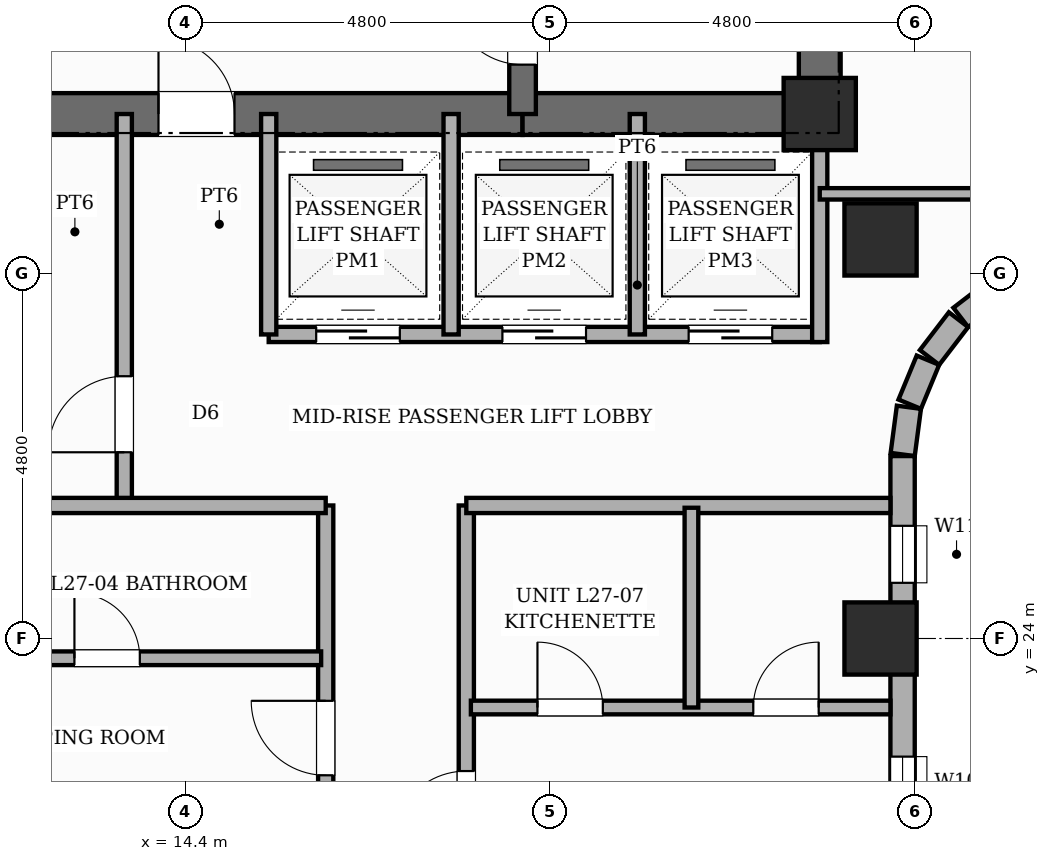
"""IFC4 building model, lengths in metres.
Left out: names, types, materials, properties, quantities, classifications, styles, units other than length and angle.
Written with IfcOpenShell. Run it as: python <this file> out.ifc"""

import sys

from ifc_helpers import new_model, si_unit, direction, frame, frame_2d, origin, origin_2d, place, context, subcontext, project, spatial, rectangle, extrude, element, fill, save


model = new_model("IFC4")
c1 = context("Model", 3, precision=1e-05, world=origin(), true_north=direction((0.0, 1.0)))
c2 = subcontext(c1, "Body", "Model", "MODEL_VIEW")
j1 = project(units=[si_unit("LENGTHUNIT", "METRE"), si_unit("PLANEANGLEUNIT", "RADIAN")], contexts=[c1])
p1 = place(None, origin())
s1 = spatial("IfcSite", under=j1, at=p1, CompositionType="ELEMENT")
p2 = place(p1, origin())
s2 = spatial("IfcBuilding", under=s1, at=p2, CompositionType="ELEMENT")
p3 = place(p2, frame((0.0, 0.0, 107.2)))
s3 = spatial("IfcBuildingStorey", under=s2, at=p3, CompositionType="ELEMENT", Elevation=107.2)
p4 = place(p3, frame((22.75, 30.625, 0.0), z_axis=(0.0, 0.0, 1.0), x_axis=(0.0, 1.0, 0.0)))
e1 = element("IfcWall", 1, at=p4, inside=s3, PredefinedType="SHEAR", context=c2, shape_type="SweptSolid", body=[
    extrude(rectangle(XDim=15.45, YDim=0.55, at=frame_2d((7.725, 0.0))), origin(), (0.0, 0.0, 1.0), 3.6),
])
p5 = place(p4, frame((10.725, 0.0, 0.0)))
e2 = element("IfcOpeningElement", 2, at=p5, cuts=e1, PredefinedType="OPENING", context=c2, shape_type="SweptSolid", body=[
    extrude(rectangle(XDim=1.0, YDim=2.15, at=frame_2d((0.5, 1.075))), frame((0.0, 0.285, 0.0), z_axis=(0.0, -1.0, 0.0), x_axis=(1.0, 0.0, 0.0)), (0.0, 0.0, 1.0), 0.57),
])
p6 = place(p3, frame((9.96, 30.9, 0.0), z_axis=(0.0, 0.0, 1.0), x_axis=(1.0, 0.0, 0.0)))
e3 = element("IfcWall", 3, at=p6, inside=s3, PredefinedType="SHEAR", context=c2, shape_type="SweptSolid", body=[
    extrude(rectangle(XDim=8.88, YDim=0.55, at=frame_2d((4.44, 0.0))), origin(), (0.0, 0.0, 1.0), 3.6),
])
p7 = place(p6, frame((4.09, 0.0, 0.0)))
e4 = element("IfcOpeningElement", 4, at=p7, cuts=e3, PredefinedType="OPENING", context=c2, shape_type="SweptSolid", body=[
    extrude(rectangle(XDim=1.0, YDim=2.15, at=frame_2d((0.5, 1.075))), frame((0.0, 0.285, 0.0), z_axis=(0.0, -1.0, 0.0), x_axis=(1.0, 0.0, 0.0)), (0.0, 0.0, 1.0), 0.57),
])
p8 = place(p3, frame((18.84, 30.9, 0.0), z_axis=(0.0, 0.0, 1.0), x_axis=(1.0, 0.0, 0.0)))
e5 = element("IfcWall", 5, at=p8, inside=s3, PredefinedType="SHEAR", context=c2, shape_type="SweptSolid", body=[
    extrude(rectangle(XDim=3.91, YDim=0.55, at=frame_2d((1.955, 0.0))), origin(), (0.0, 0.0, 1.0), 3.6),
])
p9 = place(p3, frame((18.84, 30.9, 0.0), z_axis=(0.0, 0.0, 1.0), x_axis=(0.0, 1.0, 0.0)))
e6 = element("IfcWall", 6, at=p9, inside=s3, PredefinedType="SHEAR", context=c2, shape_type="SweptSolid", body=[
    extrude(rectangle(XDim=14.9, YDim=0.35, at=frame_2d((7.45, 0.0))), origin(), (0.0, 0.0, 1.0), 3.6),
])
p10 = place(p9, frame((0.65, 0.0, 0.0)))
e7 = element("IfcOpeningElement", 7, at=p10, cuts=e6, PredefinedType="OPENING", context=c2, shape_type="SweptSolid", body=[
    extrude(rectangle(XDim=0.95, YDim=2.1, at=frame_2d((0.475, 1.05))), frame((0.0, 0.185, 0.0), z_axis=(0.0, -1.0, 0.0), x_axis=(1.0, 0.0, 0.0)), (0.0, 0.0, 1.0), 0.37),
])
p11 = place(p9, frame((10.45, 0.0, 0.0)))
e8 = element("IfcOpeningElement", 8, at=p11, cuts=e6, PredefinedType="OPENING", context=c2, shape_type="SweptSolid", body=[
    extrude(rectangle(XDim=1.0, YDim=2.15, at=frame_2d((0.5, 1.075))), frame((0.0, 0.185, 0.0), z_axis=(0.0, -1.0, 0.0), x_axis=(1.0, 0.0, 0.0)), (0.0, 0.0, 1.0), 0.37),
])
for number, where, z_axis, x_axis in (
    (9, (22.75, 30.9, 0.0), (0.0, 0.0, 1.0), (1.0, 0.0, 0.0)),
    (10, (23.55, 24.0, 0.0), (0.0, 0.0, 1.0), (1.0, 0.0, 0.0)),
    (11, (23.55, 29.25, 0.0), (0.0, 0.0, 1.0), (1.0, 0.0, 0.0)),
):
    element("IfcColumn", number, at=place(p3, frame(where, z_axis=z_axis, x_axis=x_axis)), inside=s3, PredefinedType="COLUMN", context=c2, shape_type="SweptSolid", body=[
        extrude(rectangle(XDim=0.95, YDim=0.95, at=origin_2d()), origin(), (0.0, 0.0, 1.0), 3.6),
    ])
for number, where, z_axis, x_axis in (
    (12, (25.103, 28.605, 0.0), (0.0, 0.0, 1.0), (-0.793, -0.609, 0.0)),
    (13, (24.576, 28.195, 0.0), (0.0, 0.0, 1.0), (-0.609, -0.793, 0.0)),
):
    element("IfcWall", number, at=place(p3, frame(where, z_axis=z_axis, x_axis=x_axis)), inside=s3, PredefinedType="STANDARD", context=c2, shape_type="SweptSolid", body=[
        extrude(rectangle(XDim=0.626, YDim=0.32, at=frame_2d((0.313, 0.0))), origin(), (0.0, 0.0, 1.0), 3.36),
    ])
p12 = place(p3, frame((24.174, 27.661, 0.0), z_axis=(0.0, 0.0, 1.0), x_axis=(-0.382455093999, -0.923974080304, 0.0)))
e14 = element("IfcWall", 14, at=p12, inside=s3, PredefinedType="STANDARD", context=c2, shape_type="SweptSolid", body=[
    extrude(rectangle(XDim=0.626, YDim=0.32, at=frame_2d((0.313, 0.0))), origin(), (0.0, 0.0, 1.0), 3.36),
])
p13 = place(p3, frame((23.923, 27.042, 0.0), z_axis=(0.0, 0.0, 1.0), x_axis=(-0.130555323746, -0.9914410257, 0.0)))
e15 = element("IfcWall", 15, at=p13, inside=s3, PredefinedType="STANDARD", context=c2, shape_type="SweptSolid", body=[
    extrude(rectangle(XDim=0.626, YDim=0.32, at=frame_2d((0.313, 0.0))), origin(), (0.0, 0.0, 1.0), 2.54),
])
p14 = place(p3, frame((23.84, 26.4, 0.0), z_axis=(0.0, 0.0, 1.0), x_axis=(0.0, -1.0, 0.0)))
e16 = element("IfcWall", 16, at=p14, inside=s3, PredefinedType="STANDARD", context=c2, shape_type="SweptSolid", body=[
    extrude(rectangle(XDim=14.4, YDim=0.32, at=frame_2d((7.2, 0.0))), origin(), (0.0, 0.0, 1.0), 2.54),
])
p15 = place(p14, frame((9.354, 0.0, 0.65)))
e17 = element("IfcOpeningElement", 17, at=p15, cuts=e16, PredefinedType="OPENING", context=c2, shape_type="SweptSolid", body=[
    extrude(rectangle(XDim=1.4, YDim=1.1, at=frame_2d((0.7, 0.55))), frame((0.0, 0.17, 0.0), z_axis=(0.0, -1.0, 0.0), x_axis=(1.0, 0.0, 0.0)), (0.0, 0.0, 1.0), 0.34),
])
p16 = place(p14, frame((3.954, 0.0, 0.65)))
e18 = element("IfcOpeningElement", 18, at=p16, cuts=e16, PredefinedType="OPENING", context=c2, shape_type="SweptSolid", body=[
    extrude(rectangle(XDim=1.4, YDim=1.1, at=frame_2d((0.7, 0.55))), frame((0.0, 0.17, 0.0), z_axis=(0.0, -1.0, 0.0), x_axis=(1.0, 0.0, 0.0)), (0.0, 0.0, 1.0), 0.34),
])
p17 = place(p14, frame((12.707, 0.0, 0.45)))
e19 = element("IfcOpeningElement", 19, at=p17, cuts=e16, PredefinedType="OPENING", context=c2, shape_type="SweptSolid", body=[
    extrude(rectangle(XDim=0.95, YDim=1.8, at=frame_2d((0.475, 0.9))), frame((0.0, 0.17, 0.0), z_axis=(0.0, -1.0, 0.0), x_axis=(1.0, 0.0, 0.0)), (0.0, 0.0, 1.0), 0.34),
])
p18 = place(p14, frame((7.902, 0.0, 0.45)))
e20 = element("IfcOpeningElement", 20, at=p18, cuts=e16, PredefinedType="OPENING", context=c2, shape_type="SweptSolid", body=[
    extrude(rectangle(XDim=0.6, YDim=1.8, at=frame_2d((0.3, 0.9))), frame((0.0, 0.17, 0.0), z_axis=(0.0, -1.0, 0.0), x_axis=(1.0, 0.0, 0.0)), (0.0, 0.0, 1.0), 0.34),
])
p19 = place(p14, frame((0.917, 0.0, 0.45)))
e21 = element("IfcOpeningElement", 21, at=p19, cuts=e16, PredefinedType="OPENING", context=c2, shape_type="SweptSolid", body=[
    extrude(rectangle(XDim=0.75, YDim=1.8, at=frame_2d((0.375, 0.9))), frame((0.0, 0.17, 0.0), z_axis=(0.0, -1.0, 0.0), x_axis=(1.0, 0.0, 0.0)), (0.0, 0.0, 1.0), 0.34),
])
p20 = place(p3, frame((13.6, 25.75, 0.0), z_axis=(0.0, 0.0, 1.0), x_axis=(0.0, 1.0, 0.0)))
e22 = element("IfcWall", 22, at=p20, inside=s3, PredefinedType="POLYGONAL", context=c2, shape_type="SweptSolid", body=[
    extrude(rectangle(XDim=5.15, YDim=0.2, at=frame_2d((2.575, 0.0))), origin(), (0.0, 0.0, 1.0), 3.36),
])
p21 = place(p20, frame((0.7, 0.0, 0.0)))
e23 = element("IfcOpeningElement", 23, at=p21, cuts=e22, PredefinedType="OPENING", context=c2, shape_type="SweptSolid", body=[
    extrude(rectangle(XDim=1.0, YDim=2.15, at=frame_2d((0.5, 1.075))), frame((0.0, 0.11, 0.0), z_axis=(0.0, -1.0, 0.0), x_axis=(1.0, 0.0, 0.0)), (0.0, 0.0, 1.0), 0.22),
])
p22 = place(p3, frame((15.5, 28.0, 0.0), z_axis=(0.0, 0.0, 1.0), x_axis=(1.0, 0.0, 0.0)))
e24 = element("IfcWall", 24, at=p22, inside=s3, PredefinedType="POLYGONAL", context=c2, shape_type="SweptSolid", body=[
    extrude(rectangle(XDim=7.25, YDim=0.2, at=frame_2d((3.625, 0.0))), origin(), (0.0, 0.0, 1.0), 3.36),
])
p23 = place(p22, frame((0.625, 0.0, 0.0)))
e25 = element("IfcOpeningElement", 25, at=p23, cuts=e24, PredefinedType="OPENING", context=c2, shape_type="SweptSolid", body=[
    extrude(rectangle(XDim=1.1, YDim=2.15, at=frame_2d((0.55, 1.075))), frame((0.0, 0.11, 0.0), z_axis=(0.0, -1.0, 0.0), x_axis=(1.0, 0.0, 0.0)), (0.0, 0.0, 1.0), 0.22),
])
p24 = place(p22, frame((3.075, 0.0, 0.0)))
e26 = element("IfcOpeningElement", 26, at=p24, cuts=e24, PredefinedType="OPENING", context=c2, shape_type="SweptSolid", body=[
    extrude(rectangle(XDim=1.1, YDim=2.15, at=frame_2d((0.55, 1.075))), frame((0.0, 0.11, 0.0), z_axis=(0.0, -1.0, 0.0), x_axis=(1.0, 0.0, 0.0)), (0.0, 0.0, 1.0), 0.22),
])
p25 = place(p22, frame((5.525, 0.0, 0.0)))
e27 = element("IfcOpeningElement", 27, at=p25, cuts=e24, PredefinedType="OPENING", context=c2, shape_type="SweptSolid", body=[
    extrude(rectangle(XDim=1.1, YDim=2.15, at=frame_2d((0.55, 1.075))), frame((0.0, 0.11, 0.0), z_axis=(0.0, -1.0, 0.0), x_axis=(1.0, 0.0, 0.0)), (0.0, 0.0, 1.0), 0.22),
])
p26 = place(p3, frame((15.5, 28.0, 0.0), z_axis=(0.0, 0.0, 1.0), x_axis=(0.0, 1.0, 0.0)))
e28 = element("IfcWall", 28, at=p26, inside=s3, PredefinedType="POLYGONAL", context=c2, shape_type="SweptSolid", body=[
    extrude(rectangle(XDim=2.9, YDim=0.2, at=frame_2d((1.45, 0.0))), origin(), (0.0, 0.0, 1.0), 3.36),
])
p27 = place(p3, frame((22.75, 27.9, 0.0), z_axis=(0.0, 0.0, 1.0), x_axis=(0.0, 1.0, 0.0)))
e29 = element("IfcWall", 29, at=p27, inside=s3, PredefinedType="POLYGONAL", context=c2, shape_type="SweptSolid", body=[
    extrude(rectangle(XDim=3.0, YDim=0.2, at=frame_2d((1.5, 0.0))), origin(), (0.0, 0.0, 1.0), 3.36),
])
for number, where, z_axis, x_axis in (
    (30, (17.9, 28.0, 0.0), (0.0, 0.0, 1.0), (0.0, 1.0, 0.0)),
    (31, (20.35, 28.0, 0.0), (0.0, 0.0, 1.0), (0.0, 1.0, 0.0)),
):
    element("IfcWall", number, at=place(p3, frame(where, z_axis=z_axis, x_axis=x_axis)), inside=s3, PredefinedType="POLYGONAL", context=c2, shape_type="SweptSolid", body=[
        extrude(rectangle(XDim=2.9, YDim=0.2, at=frame_2d((1.45, 0.0))), origin(), (0.0, 0.0, 1.0), 3.36),
    ])
p28 = place(p3, frame((16.25, 9.92, 0.0), z_axis=(0.0, 0.0, 1.0), x_axis=(0.0, 1.0, 0.0)))
e32 = element("IfcWall", 32, at=p28, inside=s3, PredefinedType="PARTITIONING", context=c2, shape_type="SweptSolid", body=[
    extrude(rectangle(XDim=15.83, YDim=0.2, at=frame_2d((7.915, 0.0))), origin(), (0.0, 0.0, 1.0), 3.36),
])
p29 = place(p28, frame((0.835, 0.0, 0.0)))
e33 = element("IfcOpeningElement", 33, at=p29, cuts=e32, PredefinedType="OPENING", context=c2, shape_type="SweptSolid", body=[
    extrude(rectangle(XDim=0.98, YDim=2.18, at=frame_2d((0.49, 1.09))), frame((0.0, 0.11, 0.0), z_axis=(0.0, -1.0, 0.0), x_axis=(1.0, 0.0, 0.0)), (0.0, 0.0, 1.0), 0.22),
])
p30 = place(p28, frame((4.415, 0.0, 0.0)))
e34 = element("IfcOpeningElement", 34, at=p30, cuts=e32, PredefinedType="OPENING", context=c2, shape_type="SweptSolid", body=[
    extrude(rectangle(XDim=0.98, YDim=2.18, at=frame_2d((0.49, 1.09))), frame((0.0, 0.11, 0.0), z_axis=(0.0, -1.0, 0.0), x_axis=(1.0, 0.0, 0.0)), (0.0, 0.0, 1.0), 0.22),
])
p31 = place(p28, frame((8.415, 0.0, 0.0)))
e35 = element("IfcOpeningElement", 35, at=p31, cuts=e32, PredefinedType="OPENING", context=c2, shape_type="SweptSolid", body=[
    extrude(rectangle(XDim=0.98, YDim=2.18, at=frame_2d((0.49, 1.09))), frame((0.0, 0.11, 0.0), z_axis=(0.0, -1.0, 0.0), x_axis=(1.0, 0.0, 0.0)), (0.0, 0.0, 1.0), 0.22),
])
p32 = place(p28, frame((12.28, 0.0, 0.0)))
e36 = element("IfcOpeningElement", 36, at=p32, cuts=e32, PredefinedType="OPENING", context=c2, shape_type="SweptSolid", body=[
    extrude(rectangle(XDim=0.98, YDim=2.18, at=frame_2d((0.49, 1.09))), frame((0.0, 0.11, 0.0), z_axis=(0.0, -1.0, 0.0), x_axis=(1.0, 0.0, 0.0)), (0.0, 0.0, 1.0), 0.22),
])
p33 = place(p3, frame((18.1, 9.92, 0.0), z_axis=(0.0, 0.0, 1.0), x_axis=(0.0, 1.0, 0.0)))
e37 = element("IfcWall", 37, at=p33, inside=s3, PredefinedType="PARTITIONING", context=c2, shape_type="SweptSolid", body=[
    extrude(rectangle(XDim=15.83, YDim=0.2, at=frame_2d((7.915, 0.0))), origin(), (0.0, 0.0, 1.0), 3.36),
])
p34 = place(p33, frame((0.946, 0.0, 0.0)))
e38 = element("IfcOpeningElement", 38, at=p34, cuts=e37, PredefinedType="OPENING", context=c2, shape_type="SweptSolid", body=[
    extrude(rectangle(XDim=0.98, YDim=2.18, at=frame_2d((0.49, 1.09))), frame((0.0, 0.11, 0.0), z_axis=(0.0, -1.0, 0.0), x_axis=(1.0, 0.0, 0.0)), (0.0, 0.0, 1.0), 0.22),
])
p35 = place(p33, frame((5.956, 0.0, 0.0)))
e39 = element("IfcOpeningElement", 39, at=p35, cuts=e37, PredefinedType="OPENING", context=c2, shape_type="SweptSolid", body=[
    extrude(rectangle(XDim=0.98, YDim=2.18, at=frame_2d((0.49, 1.09))), frame((0.0, 0.11, 0.0), z_axis=(0.0, -1.0, 0.0), x_axis=(1.0, 0.0, 0.0)), (0.0, 0.0, 1.0), 0.22),
])
p36 = place(p33, frame((11.356, 0.0, 0.0)))
e40 = element("IfcOpeningElement", 40, at=p36, cuts=e37, PredefinedType="OPENING", context=c2, shape_type="SweptSolid", body=[
    extrude(rectangle(XDim=0.98, YDim=2.18, at=frame_2d((0.49, 1.09))), frame((0.0, 0.11, 0.0), z_axis=(0.0, -1.0, 0.0), x_axis=(1.0, 0.0, 0.0)), (0.0, 0.0, 1.0), 0.22),
])
p37 = place(p3, frame((5.12, 25.75, 0.0), z_axis=(0.0, 0.0, 1.0), x_axis=(1.0, 0.0, 0.0)))
e41 = element("IfcWall", 41, at=p37, inside=s3, PredefinedType="PARTITIONING", context=c2, shape_type="SweptSolid", body=[
    extrude(rectangle(XDim=11.13, YDim=0.2, at=frame_2d((5.565, 0.0))), origin(), (0.0, 0.0, 1.0), 3.36),
])
p38 = place(p3, frame((18.1, 25.75, 0.0), z_axis=(0.0, 0.0, 1.0), x_axis=(1.0, 0.0, 0.0)))
e42 = element("IfcWall", 42, at=p38, inside=s3, PredefinedType="PARTITIONING", context=c2, shape_type="SweptSolid", body=[
    extrude(rectangle(XDim=5.58, YDim=0.2, at=frame_2d((2.79, 0.0))), origin(), (0.0, 0.0, 1.0), 3.36),
])
p39 = place(p3, frame((5.12, 23.74, 0.0), z_axis=(0.0, 0.0, 1.0), x_axis=(1.0, 0.0, 0.0)))
e43 = element("IfcWall", 43, at=p39, inside=s3, PredefinedType="PLUMBINGWALL", context=c2, shape_type="SweptSolid", body=[
    extrude(rectangle(XDim=11.07, YDim=0.18, at=frame_2d((5.535, 0.0))), origin(), (0.0, 0.0, 1.0), 2.54),
])
p40 = place(p39, frame((2.209, 0.0, 0.0)))
e44 = element("IfcOpeningElement", 44, at=p40, cuts=e43, PredefinedType="OPENING", context=c2, shape_type="SweptSolid", body=[
    extrude(rectangle(XDim=0.86, YDim=2.1, at=frame_2d((0.43, 1.05))), frame((0.0, 0.1, 0.0), z_axis=(0.0, -1.0, 0.0), x_axis=(1.0, 0.0, 0.0)), (0.0, 0.0, 1.0), 0.2),
])
p41 = place(p39, frame((7.824, 0.0, 0.0)))
e45 = element("IfcOpeningElement", 45, at=p41, cuts=e43, PredefinedType="OPENING", context=c2, shape_type="SweptSolid", body=[
    extrude(rectangle(XDim=0.86, YDim=2.1, at=frame_2d((0.43, 1.05))), frame((0.0, 0.1, 0.0), z_axis=(0.0, -1.0, 0.0), x_axis=(1.0, 0.0, 0.0)), (0.0, 0.0, 1.0), 0.2),
])
p42 = place(p3, frame((18.16, 23.092, 0.0), z_axis=(0.0, 0.0, 1.0), x_axis=(1.0, 0.0, 0.0)))
e46 = element("IfcWall", 46, at=p42, inside=s3, PredefinedType="PLUMBINGWALL", context=c2, shape_type="SweptSolid", body=[
    extrude(rectangle(XDim=5.52, YDim=0.18, at=frame_2d((2.76, 0.0))), origin(), (0.0, 0.0, 1.0), 3.36),
])
p43 = place(p42, frame((0.876, 0.0, 0.0)))
e47 = element("IfcOpeningElement", 47, at=p43, cuts=e46, PredefinedType="OPENING", context=c2, shape_type="SweptSolid", body=[
    extrude(rectangle(XDim=0.86, YDim=2.1, at=frame_2d((0.43, 1.05))), frame((0.0, 0.1, 0.0), z_axis=(0.0, -1.0, 0.0), x_axis=(1.0, 0.0, 0.0)), (0.0, 0.0, 1.0), 0.2),
])
p44 = place(p42, frame((3.716, 0.0, 0.0)))
e48 = element("IfcOpeningElement", 48, at=p44, cuts=e46, PredefinedType="OPENING", context=c2, shape_type="SweptSolid", body=[
    extrude(rectangle(XDim=0.86, YDim=2.1, at=frame_2d((0.43, 1.05))), frame((0.0, 0.1, 0.0), z_axis=(0.0, -1.0, 0.0), x_axis=(1.0, 0.0, 0.0)), (0.0, 0.0, 1.0), 0.2),
])
p45 = place(p3, frame((21.062, 23.092, 0.0), z_axis=(0.0, 0.0, 1.0), x_axis=(0.0, 1.0, 0.0)))
e49 = element("IfcWall", 49, at=p45, inside=s3, PredefinedType="PLUMBINGWALL", context=c2, shape_type="SweptSolid", body=[
    extrude(rectangle(XDim=2.628, YDim=0.18, at=frame_2d((1.314, 0.0))), origin(), (0.0, 0.0, 1.0), 3.36),
])
p46 = place(p3, frame((22.75, 29.85, 0.0), z_axis=(0.0, 0.0, 1.0), x_axis=(1.0, 0.0, 0.0)))
e50 = element("IfcWall", 50, at=p46, inside=s3, PredefinedType="PARTITIONING", context=c2, shape_type="SweptSolid", body=[
    extrude(rectangle(XDim=3.33, YDim=0.15, at=frame_2d((1.665, 0.0))), origin(), (0.0, 0.0, 1.0), 1.78),
])
p47 = place(p16, origin())
e51 = element("IfcWindow", 51, at=p47, inside=s3, PartitioningType="SINGLE_PANEL", PredefinedType="WINDOW", context=c2, shape_type="SweptSolid", body=[
    extrude(rectangle(XDim=1.4, YDim=1.1, at=frame_2d((0.7, 0.55))), frame((0.0, 0.03, 0.0), z_axis=(0.0, -1.0, 0.0), x_axis=(1.0, 0.0, 0.0)), (0.0, 0.0, 1.0), 0.06),
])
fill(e18, e51)
p48 = place(p19, origin())
e52 = element("IfcWindow", 52, at=p48, inside=s3, PartitioningType="SINGLE_PANEL", PredefinedType="WINDOW", context=c2, shape_type="SweptSolid", body=[
    extrude(rectangle(XDim=0.75, YDim=1.8, at=frame_2d((0.375, 0.9))), frame((0.0, 0.03, 0.0), z_axis=(0.0, -1.0, 0.0), x_axis=(1.0, 0.0, 0.0)), (0.0, 0.0, 1.0), 0.06),
])
fill(e21, e52)
p49 = place(p10, origin())
e53 = element("IfcDoor", 53, at=p49, inside=s3, OperationType="SINGLE_SWING_RIGHT", PredefinedType="DOOR", context=c2, shape_type="SweptSolid", body=[
    extrude(rectangle(XDim=0.95, YDim=2.1, at=frame_2d((0.475, 1.05))), frame((0.0, 0.025, 0.0), z_axis=(0.0, -1.0, 0.0), x_axis=(1.0, 0.0, 0.0)), (0.0, 0.0, 1.0), 0.05),
])
fill(e7, e53)
p50 = place(p7, origin())
e54 = element("IfcDoor", 54, at=p50, inside=s3, OperationType="SINGLE_SWING_LEFT", PredefinedType="DOOR", context=c2, shape_type="SweptSolid", body=[
    extrude(rectangle(XDim=1.0, YDim=2.15, at=frame_2d((0.5, 1.075))), frame((0.0, 0.025, 0.0), z_axis=(0.0, -1.0, 0.0), x_axis=(1.0, 0.0, 0.0)), (0.0, 0.0, 1.0), 0.05),
])
fill(e4, e54)
p51 = place(p21, origin())
e55 = element("IfcDoor", 55, at=p51, inside=s3, OperationType="SINGLE_SWING_LEFT", PredefinedType="DOOR", context=c2, shape_type="SweptSolid", body=[
    extrude(rectangle(XDim=1.0, YDim=2.15, at=frame_2d((0.5, 1.075))), frame((0.0, 0.025, 0.0), z_axis=(0.0, -1.0, 0.0), x_axis=(1.0, 0.0, 0.0)), (0.0, 0.0, 1.0), 0.05),
])
fill(e23, e55)
p52 = place(p23, origin())
e56 = element("IfcDoor", 56, at=p52, inside=s3, OperationType="SLIDING_TO_LEFT", PredefinedType="DOOR", context=c2, shape_type="SweptSolid", body=[
    extrude(rectangle(XDim=1.1, YDim=2.15, at=frame_2d((0.55, 1.075))), frame((0.0, 0.025, 0.0), z_axis=(0.0, -1.0, 0.0), x_axis=(1.0, 0.0, 0.0)), (0.0, 0.0, 1.0), 0.05),
])
fill(e25, e56)
p53 = place(p24, origin())
e57 = element("IfcDoor", 57, at=p53, inside=s3, OperationType="SLIDING_TO_RIGHT", PredefinedType="DOOR", context=c2, shape_type="SweptSolid", body=[
    extrude(rectangle(XDim=1.1, YDim=2.15, at=frame_2d((0.55, 1.075))), frame((0.0, 0.025, 0.0), z_axis=(0.0, -1.0, 0.0), x_axis=(1.0, 0.0, 0.0)), (0.0, 0.0, 1.0), 0.05),
])
fill(e26, e57)
p54 = place(p25, origin())
e58 = element("IfcDoor", 58, at=p54, inside=s3, OperationType="SLIDING_TO_LEFT", PredefinedType="DOOR", context=c2, shape_type="SweptSolid", body=[
    extrude(rectangle(XDim=1.1, YDim=2.15, at=frame_2d((0.55, 1.075))), frame((0.0, 0.025, 0.0), z_axis=(0.0, -1.0, 0.0), x_axis=(1.0, 0.0, 0.0)), (0.0, 0.0, 1.0), 0.05),
])
fill(e27, e58)
p55 = place(p32, origin())
e59 = element("IfcDoor", 59, at=p55, inside=s3, OperationType="SINGLE_SWING_RIGHT", PredefinedType="DOOR", context=c2, shape_type="SweptSolid", body=[
    extrude(rectangle(XDim=0.98, YDim=2.18, at=frame_2d((0.49, 1.09))), frame((0.0, 0.025, 0.0), z_axis=(0.0, -1.0, 0.0), x_axis=(1.0, 0.0, 0.0)), (0.0, 0.0, 1.0), 0.05),
])
fill(e36, e59)
p56 = place(p41, origin())
e60 = element("IfcDoor", 60, at=p56, inside=s3, OperationType="SINGLE_SWING_LEFT", PredefinedType="DOOR", context=c2, shape_type="SweptSolid", body=[
    extrude(rectangle(XDim=0.86, YDim=2.1, at=frame_2d((0.43, 1.05))), frame((0.0, 0.025, 0.0), z_axis=(0.0, -1.0, 0.0), x_axis=(1.0, 0.0, 0.0)), (0.0, 0.0, 1.0), 0.05),
])
fill(e45, e60)
p57 = place(p36, origin())
e61 = element("IfcDoor", 61, at=p57, inside=s3, OperationType="SINGLE_SWING_LEFT", PredefinedType="DOOR", context=c2, shape_type="SweptSolid", body=[
    extrude(rectangle(XDim=0.98, YDim=2.18, at=frame_2d((0.49, 1.09))), frame((0.0, 0.025, 0.0), z_axis=(0.0, -1.0, 0.0), x_axis=(1.0, 0.0, 0.0)), (0.0, 0.0, 1.0), 0.05),
])
fill(e40, e61)
p58 = place(p43, origin())
e62 = element("IfcDoor", 62, at=p58, inside=s3, OperationType="SINGLE_SWING_LEFT", PredefinedType="DOOR", context=c2, shape_type="SweptSolid", body=[
    extrude(rectangle(XDim=0.86, YDim=2.1, at=frame_2d((0.43, 1.05))), frame((0.0, 0.025, 0.0), z_axis=(0.0, -1.0, 0.0), x_axis=(1.0, 0.0, 0.0)), (0.0, 0.0, 1.0), 0.05),
])
fill(e47, e62)
p59 = place(p44, origin())
e63 = element("IfcDoor", 63, at=p59, inside=s3, OperationType="SINGLE_SWING_RIGHT", PredefinedType="DOOR", context=c2, shape_type="SweptSolid", body=[
    extrude(rectangle(XDim=0.86, YDim=2.1, at=frame_2d((0.43, 1.05))), frame((0.0, 0.025, 0.0), z_axis=(0.0, -1.0, 0.0), x_axis=(1.0, 0.0, 0.0)), (0.0, 0.0, 1.0), 0.05),
])
fill(e48, e63)
save(model, sys.argv[1])
